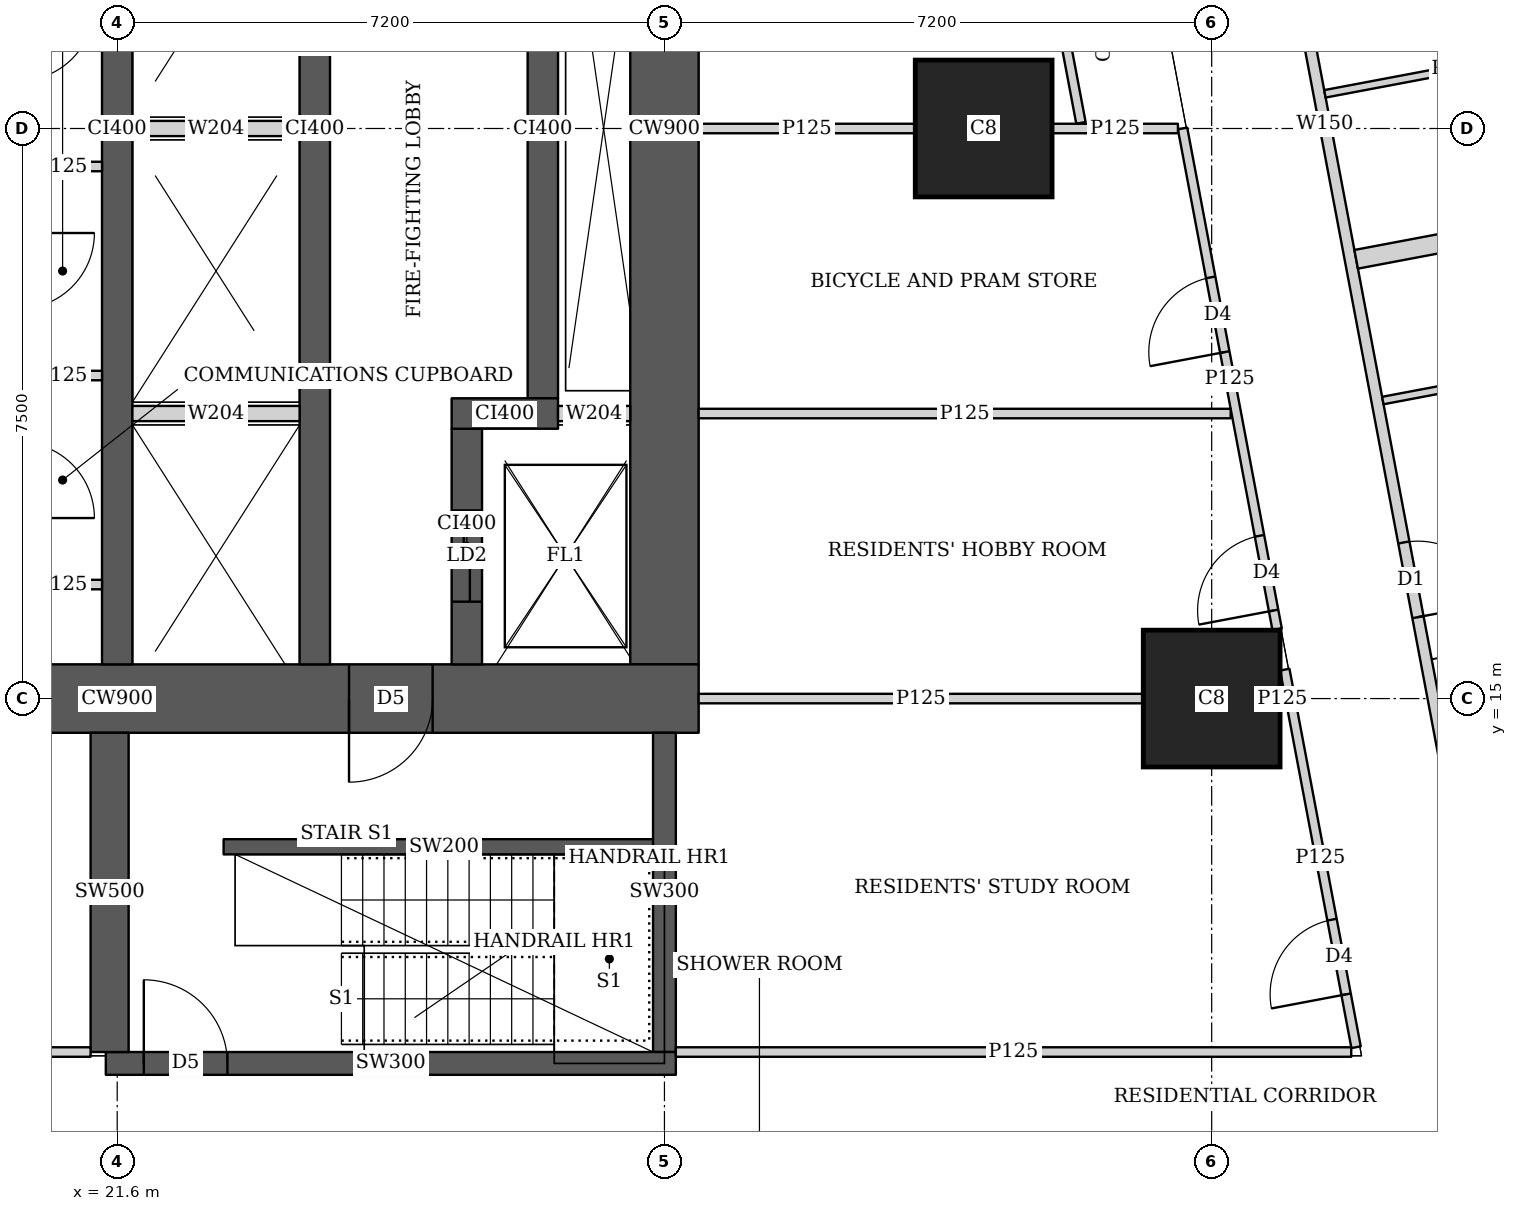
"""IFC4 building model, lengths in metres.
Left out: names, types, materials, properties, quantities, classifications, styles, units other than length and angle.
Written with IfcOpenShell. Run it as: python <this file> out.ifc"""

import sys

from ifc_helpers import new_model, si_unit, direction, frame, frame_2d, origin, origin_2d, place, context, subcontext, project, spatial, rectangle, extrude, element, fill, save


model = new_model("IFC4")
c1 = context("Model", 3, precision=1e-05, world=origin(), true_north=direction((0.0, 1.0)))
c2 = subcontext(c1, "Body", "Model", "MODEL_VIEW")
j1 = project(units=[si_unit("LENGTHUNIT", "METRE"), si_unit("PLANEANGLEUNIT", "RADIAN")], contexts=[c1])
p1 = place(None, origin())
s1 = spatial("IfcSite", under=j1, at=p1, CompositionType="ELEMENT")
p2 = place(p1, origin())
s2 = spatial("IfcBuilding", under=s1, at=p2, CompositionType="ELEMENT")
p3 = place(p2, frame((0.0, 0.0, 20.0)))
s3 = spatial("IfcBuildingStorey", under=s2, at=p3, CompositionType="ELEMENT", Elevation=20.0)
for number, where, z_axis, x_axis in (
    (1, (36.0, 15.0, 0.0), (0.0, 0.0, 1.0), (1.0, 0.0, 0.0)),
    (2, (33.0, 22.5, 0.0), (0.0, 0.0, 1.0), (1.0, 0.0, 0.0)),
):
    element("IfcColumn", number, at=place(p3, frame(where, z_axis=z_axis, x_axis=x_axis)), inside=s3, PredefinedType="COLUMN", context=c2, shape_type="SweptSolid", body=[
        extrude(rectangle(XDim=1.8, YDim=1.8, at=origin_2d()), origin(), (0.0, 0.0, 1.0), 3.75),
    ])
p4 = place(p3, frame((13.95, 15.0, 0.0), z_axis=(0.0, 0.0, 1.0), x_axis=(1.0, 0.0, 0.0)))
e3 = element("IfcWall", 3, at=p4, inside=s3, PredefinedType="SHEAR", context=c2, shape_type="SweptSolid", body=[
    extrude(rectangle(XDim=15.3, YDim=0.9, at=frame_2d((7.65, 0.0))), origin(), (0.0, 0.0, 1.0), 3.75),
])
p5 = place(p4, frame((4.45, 0.0, 0.0)))
e4 = element("IfcOpeningElement", 4, at=p5, cuts=e3, PredefinedType="OPENING", context=c2, shape_type="SweptSolid", body=[
    extrude(rectangle(XDim=1.8, YDim=2.1, at=frame_2d((0.9, 1.05))), frame((0.0, 0.46, 0.0), z_axis=(0.0, -1.0, 0.0), x_axis=(1.0, 0.0, 0.0)), (0.0, 0.0, 1.0), 0.92),
])
p6 = place(p4, frame((10.7, 0.0, 0.0)))
e5 = element("IfcOpeningElement", 5, at=p6, cuts=e3, PredefinedType="OPENING", context=c2, shape_type="SweptSolid", body=[
    extrude(rectangle(XDim=1.1, YDim=2.1, at=frame_2d((0.55, 1.05))), frame((0.0, 0.46, 0.0), z_axis=(0.0, -1.0, 0.0), x_axis=(1.0, 0.0, 0.0)), (0.0, 0.0, 1.0), 0.92),
])
p7 = place(p3, frame((28.8, 15.45, 0.0), z_axis=(0.0, 0.0, 1.0), x_axis=(0.0, 1.0, 0.0)))
e6 = element("IfcWall", 6, at=p7, inside=s3, PredefinedType="SHEAR", context=c2, shape_type="SweptSolid", body=[
    extrude(rectangle(XDim=14.1, YDim=0.9, at=frame_2d((7.05, 0.0))), origin(), (0.0, 0.0, 1.0), 3.75),
])
for number, where, z_axis, x_axis in (
    (7, (21.6, 15.45, 0.0), (0.0, 0.0, 1.0), (0.0, 1.0, 0.0)),
    (8, (24.2, 15.45, 0.0), (0.0, 0.0, 1.0), (0.0, 1.0, 0.0)),
):
    element("IfcWall", number, at=place(p3, frame(where, z_axis=z_axis, x_axis=x_axis)), inside=s3, PredefinedType="SHEAR", context=c2, shape_type="SweptSolid", body=[
        extrude(rectangle(XDim=14.1, YDim=0.4, at=frame_2d((7.05, 0.0))), origin(), (0.0, 0.0, 1.0), 3.75),
    ])
p8 = place(p3, frame((26.2, 15.45, 0.0), z_axis=(0.0, 0.0, 1.0), x_axis=(0.0, 1.0, 0.0)))
e9 = element("IfcWall", 9, at=p8, inside=s3, PredefinedType="SHEAR", context=c2, shape_type="SweptSolid", body=[
    extrude(rectangle(XDim=3.1, YDim=0.4, at=frame_2d((1.55, 0.0))), origin(), (0.0, 0.0, 1.0), 3.75),
])
p9 = place(p8, frame((0.825, 0.0, 0.0)))
e10 = element("IfcOpeningElement", 10, at=p9, cuts=e9, PredefinedType="OPENING", context=c2, shape_type="SweptSolid", body=[
    extrude(rectangle(XDim=1.2, YDim=2.1, at=frame_2d((0.6, 1.05))), frame((0.0, 0.21, 0.0), z_axis=(0.0, -1.0, 0.0), x_axis=(1.0, 0.0, 0.0)), (0.0, 0.0, 1.0), 0.42),
])
p10 = place(p3, frame((26.0, 18.75, 0.0), z_axis=(0.0, 0.0, 1.0), x_axis=(1.0, 0.0, 0.0)))
e11 = element("IfcWall", 11, at=p10, inside=s3, PredefinedType="SHEAR", context=c2, shape_type="SweptSolid", body=[
    extrude(rectangle(XDim=1.4, YDim=0.4, at=frame_2d((0.7, 0.0))), origin(), (0.0, 0.0, 1.0), 3.75),
])
p11 = place(p3, frame((27.2, 18.95, 0.0), z_axis=(0.0, 0.0, 1.0), x_axis=(0.0, 1.0, 0.0)))
e12 = element("IfcWall", 12, at=p11, inside=s3, PredefinedType="SHEAR", context=c2, shape_type="SweptSolid", body=[
    extrude(rectangle(XDim=7.1, YDim=0.4, at=frame_2d((3.55, 0.0))), origin(), (0.0, 0.0, 1.0), 3.75),
])
p12 = place(p3, frame((21.45, 10.2, 0.0), z_axis=(0.0, 0.0, 1.0), x_axis=(1.0, 0.0, 0.0)))
e13 = element("IfcWall", 13, at=p12, inside=s3, PredefinedType="SHEAR", context=c2, shape_type="SweptSolid", body=[
    extrude(rectangle(XDim=7.5, YDim=0.3, at=frame_2d((3.75, 0.0))), origin(), (0.0, 0.0, 1.0), 3.75),
])
p13 = place(p12, frame((0.5, 0.0, 0.0)))
e14 = element("IfcOpeningElement", 14, at=p13, cuts=e13, PredefinedType="OPENING", context=c2, shape_type="SweptSolid", body=[
    extrude(rectangle(XDim=1.1, YDim=2.1, at=frame_2d((0.55, 1.05))), frame((0.0, 0.16, 0.0), z_axis=(0.0, -1.0, 0.0), x_axis=(1.0, 0.0, 0.0)), (0.0, 0.0, 1.0), 0.32),
])
p14 = place(p3, frame((21.5, 10.35, 0.0), z_axis=(0.0, 0.0, 1.0), x_axis=(0.0, 1.0, 0.0)))
e15 = element("IfcWall", 15, at=p14, inside=s3, PredefinedType="SHEAR", context=c2, shape_type="SweptSolid", body=[
    extrude(rectangle(XDim=4.2, YDim=0.5, at=frame_2d((2.1, 0.0))), origin(), (0.0, 0.0, 1.0), 3.75),
])
p15 = place(p3, frame((28.8, 10.35, 0.0), z_axis=(0.0, 0.0, 1.0), x_axis=(0.0, 1.0, 0.0)))
e16 = element("IfcWall", 16, at=p15, inside=s3, PredefinedType="SHEAR", context=c2, shape_type="SweptSolid", body=[
    extrude(rectangle(XDim=4.2, YDim=0.3, at=frame_2d((2.1, 0.0))), origin(), (0.0, 0.0, 1.0), 3.75),
])
p16 = place(p3, frame((33.755, 42.325, 0.0), z_axis=(0.0, 0.0, 1.0), x_axis=(0.185611461091, -0.982623216453, 0.0)))
e17 = element("IfcWall", 17, at=p16, inside=s3, PredefinedType="SOLIDWALL", context=c2, shape_type="SweptSolid", body=[
    extrude(rectangle(XDim=40.241, YDim=0.15, at=frame_2d((20.121, 0.0))), origin(), (0.0, 0.0, 1.0), 2.5),
])
p17 = place(p16, frame((7.325, 0.0, 0.0)))
e18 = element("IfcOpeningElement", 18, at=p17, cuts=e17, PredefinedType="OPENING", context=c2, shape_type="SweptSolid", body=[
    extrude(rectangle(XDim=1.0, YDim=2.1, at=frame_2d((0.5, 1.05))), frame((0.0, 0.085, 0.0), z_axis=(0.0, -1.0, 0.0), x_axis=(1.0, 0.0, 0.0)), (0.0, 0.0, 1.0), 0.17),
])
p18 = place(p16, frame((11.902, 0.0, 0.0)))
e19 = element("IfcOpeningElement", 19, at=p18, cuts=e17, PredefinedType="OPENING", context=c2, shape_type="SweptSolid", body=[
    extrude(rectangle(XDim=1.0, YDim=2.1, at=frame_2d((0.5, 1.05))), frame((0.0, 0.085, 0.0), z_axis=(0.0, -1.0, 0.0), x_axis=(1.0, 0.0, 0.0)), (0.0, 0.0, 1.0), 0.17),
])
p19 = place(p16, frame((25.718, 0.0, 0.0)))
e20 = element("IfcOpeningElement", 20, at=p19, cuts=e17, PredefinedType="OPENING", context=c2, shape_type="SweptSolid", body=[
    extrude(rectangle(XDim=1.0, YDim=2.1, at=frame_2d((0.5, 1.05))), frame((0.0, 0.085, 0.0), z_axis=(0.0, -1.0, 0.0), x_axis=(1.0, 0.0, 0.0)), (0.0, 0.0, 1.0), 0.17),
])
p20 = place(p16, frame((31.788, 0.0, 0.0)))
e21 = element("IfcOpeningElement", 21, at=p20, cuts=e17, PredefinedType="OPENING", context=c2, shape_type="SweptSolid", body=[
    extrude(rectangle(XDim=1.0, YDim=2.1, at=frame_2d((0.5, 1.05))), frame((0.0, 0.085, 0.0), z_axis=(0.0, -1.0, 0.0), x_axis=(1.0, 0.0, 0.0)), (0.0, 0.0, 1.0), 0.17),
])
p21 = place(p3, frame((40.954, 23.61, 0.0), z_axis=(0.0, 0.0, 1.0), x_axis=(-0.982638553676, -0.185530247748, 0.0)))
e22 = element("IfcWall", 22, at=p21, inside=s3, PredefinedType="PARTITIONING", context=c2, shape_type="SweptSolid", body=[
    extrude(rectangle(XDim=3.525, YDim=0.1, at=frame_2d((1.763, 0.0))), origin(), (0.0, 0.0, 1.0), 2.5),
])
p22 = place(p3, frame((41.716, 19.576, 0.0), z_axis=(0.0, 0.0, 1.0), x_axis=(-0.982588017646, -0.185797706064, 0.0)))
e23 = element("IfcWall", 23, at=p22, inside=s3, PredefinedType="PARTITIONING", context=c2, shape_type="SweptSolid", body=[
    extrude(rectangle(XDim=3.525, YDim=0.1, at=frame_2d((1.763, 0.0))), origin(), (0.0, 0.0, 1.0), 3.5),
])
p23 = place(p3, frame((42.593, 21.665, 0.0), z_axis=(0.0, 0.0, 1.0), x_axis=(-0.982635807605, -0.185544791394, 0.0)))
e24 = element("IfcWall", 24, at=p23, inside=s3, PredefinedType="SOLIDWALL", context=c2, shape_type="SweptSolid", body=[
    extrude(rectangle(XDim=4.775, YDim=0.25, at=frame_2d((2.388, 0.0))), origin(), (0.0, 0.0, 1.0), 2.5),
])
p24 = place(p3, frame((10.413, 10.35, 0.0), z_axis=(0.0, 0.0, 1.0), x_axis=(1.0, 0.0, 0.0)))
e25 = element("IfcWall", 25, at=p24, inside=s3, PredefinedType="PARTITIONING", context=c2, shape_type="SweptSolid", body=[
    extrude(rectangle(XDim=10.837, YDim=0.125, at=frame_2d((5.418, 0.0))), origin(), (0.0, 0.0, 1.0), 3.5),
])
p25 = place(p24, frame((7.582, 0.0, 0.0)))
e26 = element("IfcOpeningElement", 26, at=p25, cuts=e25, PredefinedType="OPENING", context=c2, shape_type="SweptSolid", body=[
    extrude(rectangle(XDim=1.8, YDim=2.1, at=frame_2d((0.9, 1.05))), frame((0.0, 0.073, 0.0), z_axis=(0.0, -1.0, 0.0), x_axis=(1.0, 0.0, 0.0)), (0.0, 0.0, 1.0), 0.145),
])
p26 = place(p3, frame((28.95, 10.35, 0.0), z_axis=(0.0, 0.0, 1.0), x_axis=(1.0, 0.0, 0.0)))
e27 = element("IfcWall", 27, at=p26, inside=s3, PredefinedType="PARTITIONING", context=c2, shape_type="SweptSolid", body=[
    extrude(rectangle(XDim=8.886, YDim=0.125, at=frame_2d((4.443, 0.0))), origin(), (0.0, 0.0, 1.0), 3.5),
])
p27 = place(p3, frame((37.9, 10.413, 0.0), z_axis=(0.0, 0.0, 1.0), x_axis=(-0.185527510388, 0.982639070508, 0.0)))
e28 = element("IfcWall", 28, at=p27, inside=s3, PredefinedType="PARTITIONING", context=c2, shape_type="SweptSolid", body=[
    extrude(rectangle(XDim=5.056, YDim=0.125, at=frame_2d((2.528, 0.0))), origin(), (0.0, 0.0, 1.0), 3.5),
])
p28 = place(p27, frame((0.708, 0.0, 0.0)))
e29 = element("IfcOpeningElement", 29, at=p28, cuts=e28, PredefinedType="OPENING", context=c2, shape_type="SweptSolid", body=[
    extrude(rectangle(XDim=1.0, YDim=2.1, at=frame_2d((0.5, 1.05))), frame((0.0, 0.073, 0.0), z_axis=(0.0, -1.0, 0.0), x_axis=(1.0, 0.0, 0.0)), (0.0, 0.0, 1.0), 0.145),
])
p29 = place(p3, frame((36.861, 15.913, 0.0), z_axis=(0.0, 0.0, 1.0), x_axis=(-0.185598960122, 0.982625577726, 0.0)))
e30 = element("IfcWall", 30, at=p29, inside=s3, PredefinedType="PARTITIONING", context=c2, shape_type="SweptSolid", body=[
    extrude(rectangle(XDim=6.703, YDim=0.125, at=frame_2d((3.352, 0.0))), origin(), (0.0, 0.0, 1.0), 2.5),
])
p30 = place(p29, frame((0.25, 0.0, 0.0)))
e31 = element("IfcOpeningElement", 31, at=p30, cuts=e30, PredefinedType="OPENING", context=c2, shape_type="SweptSolid", body=[
    extrude(rectangle(XDim=1.0, YDim=2.1, at=frame_2d((0.5, 1.05))), frame((0.0, 0.073, 0.0), z_axis=(0.0, -1.0, 0.0), x_axis=(1.0, 0.0, 0.0)), (0.0, 0.0, 1.0), 0.145),
])
p31 = place(p29, frame((3.71, 0.0, 0.0)))
e32 = element("IfcOpeningElement", 32, at=p31, cuts=e30, PredefinedType="OPENING", context=c2, shape_type="SweptSolid", body=[
    extrude(rectangle(XDim=1.0, YDim=2.1, at=frame_2d((0.5, 1.05))), frame((0.0, 0.073, 0.0), z_axis=(0.0, -1.0, 0.0), x_axis=(1.0, 0.0, 0.0)), (0.0, 0.0, 1.0), 0.145),
])
p32 = place(p3, frame((34.28, 22.574, 0.0), z_axis=(0.0, 0.0, 1.0), x_axis=(-0.185713862218, 0.982603867986, 0.0)))
e33 = element("IfcWall", 33, at=p32, inside=s3, PredefinedType="PARTITIONING", context=c2, shape_type="SweptSolid", body=[
    extrude(rectangle(XDim=6.628, YDim=0.125, at=frame_2d((3.314, 0.0))), origin(), (0.0, 0.0, 1.0), 2.5),
])
p33 = place(p32, frame((3.241, 0.0, 0.0)))
e34 = element("IfcOpeningElement", 34, at=p33, cuts=e33, PredefinedType="OPENING", context=c2, shape_type="SweptSolid", body=[
    extrude(rectangle(XDim=1.0, YDim=2.1, at=frame_2d((0.5, 1.05))), frame((0.0, 0.073, 0.0), z_axis=(0.0, -1.0, 0.0), x_axis=(1.0, 0.0, 0.0)), (0.0, 0.0, 1.0), 0.145),
])
p34 = place(p3, frame((29.25, 15.0, 0.0), z_axis=(0.0, 0.0, 1.0), x_axis=(1.0, 0.0, 0.0)))
e35 = element("IfcWall", 35, at=p34, inside=s3, PredefinedType="PARTITIONING", context=c2, shape_type="SweptSolid", body=[
    extrude(rectangle(XDim=5.849, YDim=0.125, at=frame_2d((2.925, 0.0))), origin(), (0.0, 0.0, 1.0), 3.5),
])
p35 = place(p3, frame((36.901, 15.0, 0.0), z_axis=(0.0, 0.0, 1.0), x_axis=(1.0, 0.0, 0.0)))
e36 = element("IfcWall", 36, at=p35, inside=s3, PredefinedType="PARTITIONING", context=c2, shape_type="SweptSolid", body=[
    extrude(rectangle(XDim=0.057, YDim=0.125, at=frame_2d((0.029, 0.0))), origin(), (0.0, 0.0, 1.0), 3.5),
])
p36 = place(p3, frame((29.25, 18.75, 0.0), z_axis=(0.0, 0.0, 1.0), x_axis=(1.0, 0.0, 0.0)))
e37 = element("IfcWall", 37, at=p36, inside=s3, PredefinedType="PARTITIONING", context=c2, shape_type="SweptSolid", body=[
    extrude(rectangle(XDim=7.0, YDim=0.125, at=frame_2d((3.5, 0.0))), origin(), (0.0, 0.0, 1.0), 3.5),
])
p37 = place(p3, frame((29.25, 22.5, 0.0), z_axis=(0.0, 0.0, 1.0), x_axis=(1.0, 0.0, 0.0)))
e38 = element("IfcWall", 38, at=p37, inside=s3, PredefinedType="PARTITIONING", context=c2, shape_type="SweptSolid", body=[
    extrude(rectangle(XDim=2.849, YDim=0.125, at=frame_2d((1.425, 0.0))), origin(), (0.0, 0.0, 1.0), 3.5),
])
p38 = place(p3, frame((33.901, 22.5, 0.0), z_axis=(0.0, 0.0, 1.0), x_axis=(1.0, 0.0, 0.0)))
e39 = element("IfcWall", 39, at=p38, inside=s3, PredefinedType="PARTITIONING", context=c2, shape_type="SweptSolid", body=[
    extrude(rectangle(XDim=1.655, YDim=0.125, at=frame_2d((0.828, 0.0))), origin(), (0.0, 0.0, 1.0), 2.5),
])
for number, where, z_axis, x_axis in (
    (40, (20.363, 16.5, 0.0), (0.0, 0.0, 1.0), (1.0, 0.0, 0.0)),
    (41, (20.363, 19.25, 0.0), (0.0, 0.0, 1.0), (1.0, 0.0, 0.0)),
    (42, (20.363, 22.0, 0.0), (0.0, 0.0, 1.0), (1.0, 0.0, 0.0)),
):
    element("IfcWall", number, at=place(p3, frame(where, z_axis=z_axis, x_axis=x_axis)), inside=s3, PredefinedType="PARTITIONING", context=c2, shape_type="SweptSolid", body=[
        extrude(rectangle(XDim=1.037, YDim=0.125, at=frame_2d((0.519, 0.0))), origin(), (0.0, 0.0, 1.0), 3.5),
    ])
p39 = place(p3, frame((23.0, 13.05, 0.0), z_axis=(0.0, 0.0, 1.0), x_axis=(1.0, 0.0, 0.0)))
e43 = element("IfcWall", 43, at=p39, inside=s3, PredefinedType="SHEAR", context=c2, shape_type="SweptSolid", body=[
    extrude(rectangle(XDim=5.8, YDim=0.2, at=frame_2d((2.9, 0.0))), origin(), (0.0, 0.0, 1.0), 3.75),
])
for number, where, z_axis, x_axis in (
    (44, (21.8, 18.75, 0.0), (0.0, 0.0, 1.0), (1.0, 0.0, 0.0)),
    (45, (21.8, 22.5, 0.0), (0.0, 0.0, 1.0), (1.0, 0.0, 0.0)),
):
    element("IfcWall", number, at=place(p3, frame(where, z_axis=z_axis, x_axis=x_axis)), inside=s3, PredefinedType="SOLIDWALL", context=c2, shape_type="SweptSolid", body=[
        extrude(rectangle(XDim=2.2, YDim=0.2, at=frame_2d((1.1, 0.0))), origin(), (0.0, 0.0, 1.0), 3.5),
    ])
p40 = place(p3, frame((27.4, 18.75, 0.0), z_axis=(0.0, 0.0, 1.0), x_axis=(1.0, 0.0, 0.0)))
e46 = element("IfcWall", 46, at=p40, inside=s3, PredefinedType="SOLIDWALL", context=c2, shape_type="SweptSolid", body=[
    extrude(rectangle(XDim=0.95, YDim=0.2, at=frame_2d((0.475, 0.0))), origin(), (0.0, 0.0, 1.0), 3.5),
])
p41 = place(p19, origin())
e47 = element("IfcDoor", 47, at=p41, inside=s3, OperationType="SINGLE_SWING_RIGHT", PredefinedType="DOOR", context=c2, shape_type="SweptSolid", body=[
    extrude(rectangle(XDim=1.0, YDim=2.1, at=frame_2d((0.5, 1.05))), frame((0.0, 0.025, 0.0), z_axis=(0.0, -1.0, 0.0), x_axis=(1.0, 0.0, 0.0)), (0.0, 0.0, 1.0), 0.05),
])
fill(e20, e47)
p42 = place(p28, origin())
e48 = element("IfcDoor", 48, at=p42, inside=s3, OperationType="SINGLE_SWING_LEFT", PredefinedType="DOOR", context=c2, shape_type="SweptSolid", body=[
    extrude(rectangle(XDim=1.0, YDim=2.1, at=frame_2d((0.5, 1.05))), frame((0.0, 0.025, 0.0), z_axis=(0.0, -1.0, 0.0), x_axis=(1.0, 0.0, 0.0)), (0.0, 0.0, 1.0), 0.05),
])
fill(e29, e48)
p43 = place(p30, origin())
e49 = element("IfcDoor", 49, at=p43, inside=s3, OperationType="SINGLE_SWING_LEFT", PredefinedType="DOOR", context=c2, shape_type="SweptSolid", body=[
    extrude(rectangle(XDim=1.0, YDim=2.1, at=frame_2d((0.5, 1.05))), frame((0.0, 0.025, 0.0), z_axis=(0.0, -1.0, 0.0), x_axis=(1.0, 0.0, 0.0)), (0.0, 0.0, 1.0), 0.05),
])
fill(e31, e49)
p44 = place(p31, origin())
e50 = element("IfcDoor", 50, at=p44, inside=s3, OperationType="SINGLE_SWING_LEFT", PredefinedType="DOOR", context=c2, shape_type="SweptSolid", body=[
    extrude(rectangle(XDim=1.0, YDim=2.1, at=frame_2d((0.5, 1.05))), frame((0.0, 0.025, 0.0), z_axis=(0.0, -1.0, 0.0), x_axis=(1.0, 0.0, 0.0)), (0.0, 0.0, 1.0), 0.05),
])
fill(e32, e50)
p45 = place(p6, origin())
e51 = element("IfcDoor", 51, at=p45, inside=s3, OperationType="SINGLE_SWING_RIGHT", PredefinedType="DOOR", context=c2, shape_type="SweptSolid", body=[
    extrude(rectangle(XDim=1.1, YDim=2.1, at=frame_2d((0.55, 1.05))), frame((0.0, 0.025, 0.0), z_axis=(0.0, -1.0, 0.0), x_axis=(1.0, 0.0, 0.0)), (0.0, 0.0, 1.0), 0.05),
])
fill(e5, e51)
p46 = place(p9, origin())
e52 = element("IfcDoor", 52, at=p46, inside=s3, OperationType="DOUBLE_DOOR_SLIDING", PredefinedType="DOOR", context=c2, shape_type="SweptSolid", body=[
    extrude(rectangle(XDim=1.2, YDim=2.1, at=frame_2d((0.6, 1.05))), frame((0.0, 0.025, 0.0), z_axis=(0.0, -1.0, 0.0), x_axis=(1.0, 0.0, 0.0)), (0.0, 0.0, 1.0), 0.05),
])
fill(e10, e52)
p47 = place(p13, origin())
e53 = element("IfcDoor", 53, at=p47, inside=s3, OperationType="SINGLE_SWING_LEFT", PredefinedType="DOOR", context=c2, shape_type="SweptSolid", body=[
    extrude(rectangle(XDim=1.1, YDim=2.1, at=frame_2d((0.55, 1.05))), frame((0.0, 0.025, 0.0), z_axis=(0.0, -1.0, 0.0), x_axis=(1.0, 0.0, 0.0)), (0.0, 0.0, 1.0), 0.05),
])
fill(e14, e53)
save(model, sys.argv[1])
